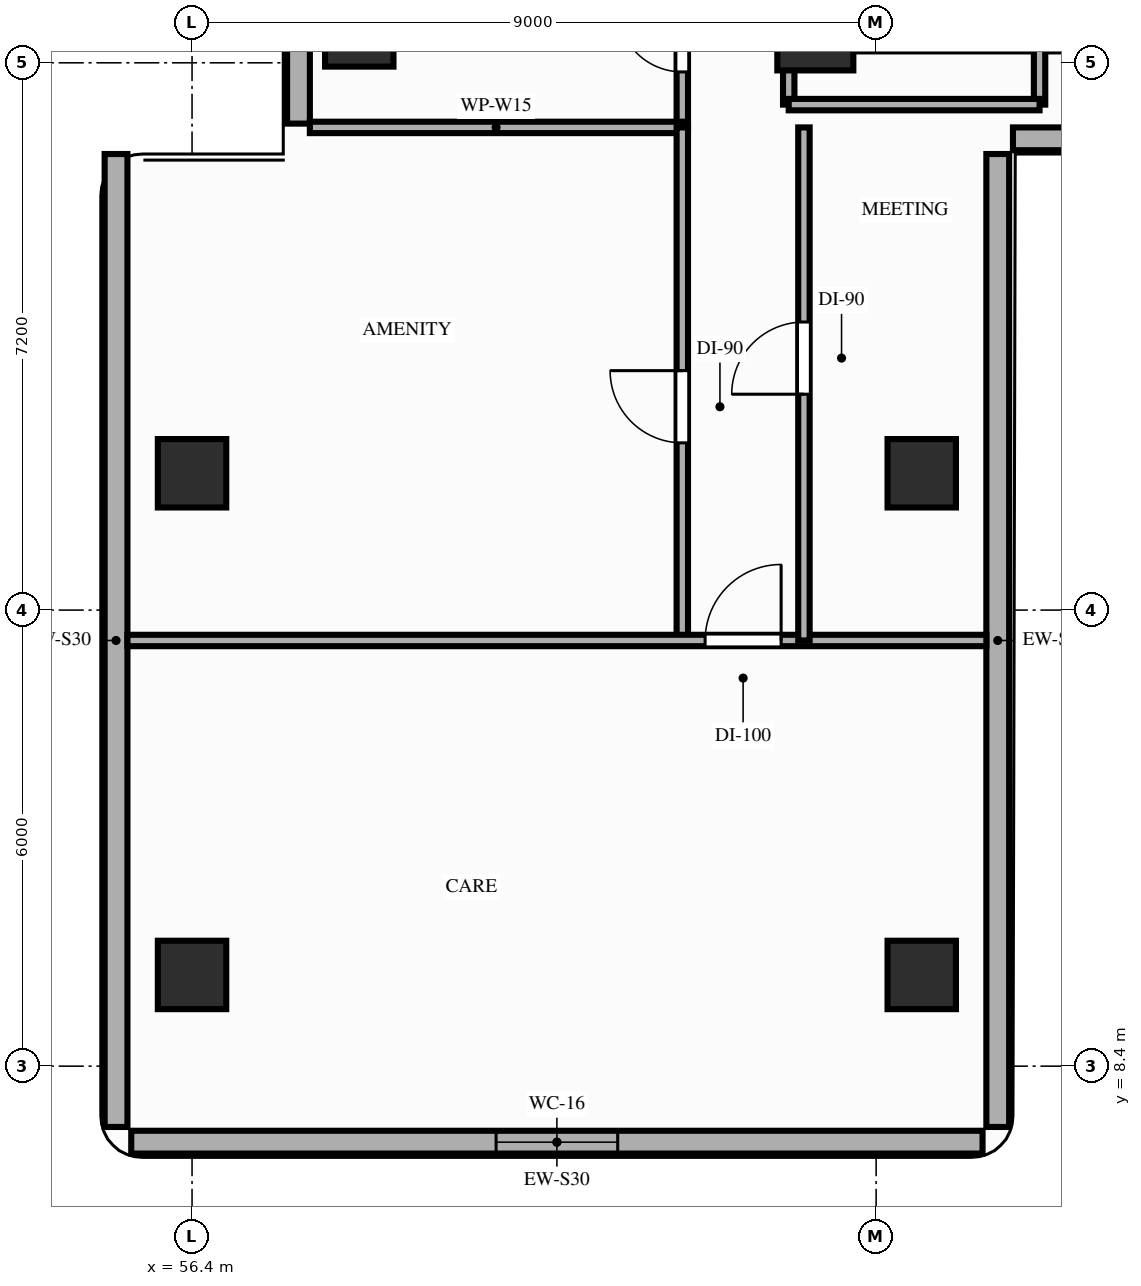
"""IFC4 building model, lengths in metres.
Left out: names, types, materials, properties, quantities, classifications, styles, units other than length and angle.
Written with IfcOpenShell. Run it as: python <this file> out.ifc"""

import sys

from ifc_helpers import new_model, si_unit, direction, frame, frame_2d, origin, origin_2d, place, context, subcontext, project, spatial, rectangle, extrude, element, fill, save


model = new_model("IFC4")
c1 = context("Model", 3, precision=1e-05, world=origin(), true_north=direction((0.0, 1.0)))
c2 = subcontext(c1, "Body", "Model", "MODEL_VIEW")
j1 = project(units=[si_unit("LENGTHUNIT", "METRE"), si_unit("PLANEANGLEUNIT", "RADIAN")], contexts=[c1])
p1 = place(None, origin())
s1 = spatial("IfcSite", under=j1, at=p1, CompositionType="ELEMENT")
p2 = place(p1, origin())
s2 = spatial("IfcBuilding", under=s1, at=p2, CompositionType="ELEMENT")
p3 = place(p2, frame((0.0, 0.0, 69.2)))
s3 = spatial("IfcBuildingStorey", under=s2, at=p3, CompositionType="ELEMENT", Elevation=69.2)
p4 = place(p3, frame((64.6, 22.0, 0.0), z_axis=(0.0, 0.0, 1.0), x_axis=(1.0, 0.0, 0.0)))
e1 = element("IfcColumn", 1, at=p4, inside=s3, PredefinedType="COLUMN", context=c2, shape_type="SweptSolid", body=[
    extrude(rectangle(XDim=1.0, YDim=1.0, at=origin_2d()), origin(), (0.0, 0.0, 1.0), 3.2),
])
for number, where, z_axis, x_axis in (
    (2, (58.6, 22.0, 0.0), (0.0, 0.0, 1.0), (1.0, 0.0, 0.0)),
    (3, (56.4, 9.6, 0.0), (0.0, 0.0, 1.0), (1.0, 0.0, 0.0)),
    (4, (56.4, 16.2, 0.0), (0.0, 0.0, 1.0), (1.0, 0.0, 0.0)),
    (5, (66.0, 9.6, 0.0), (0.0, 0.0, 1.0), (1.0, 0.0, 0.0)),
    (6, (66.0, 16.2, 0.0), (0.0, 0.0, 1.0), (1.0, 0.0, 0.0)),
):
    element("IfcColumn", number, at=place(p3, frame(where, z_axis=z_axis, x_axis=x_axis)), inside=s3, PredefinedType="COLUMN", context=c2, shape_type="SweptSolid", body=[
        extrude(rectangle(XDim=0.9, YDim=0.9, at=origin_2d()), origin(), (0.0, 0.0, 1.0), 3.2),
    ])
p5 = place(p3, frame((57.8, 43.4, 0.0), z_axis=(0.0, 0.0, 1.0), x_axis=(0.0, -1.0, 0.0)))
e7 = element("IfcWall", 7, at=p5, inside=s3, PredefinedType="STANDARD", context=c2, shape_type="SweptSolid", body=[
    extrude(rectangle(XDim=22.6, YDim=0.3, at=frame_2d((11.3, 0.0))), origin(), (0.0, 0.0, 1.0), 2.6),
])
p6 = place(p5, frame((3.6, 0.0, 0.85)))
e8 = element("IfcOpeningElement", 8, at=p6, cuts=e7, PredefinedType="OPENING", context=c2, shape_type="SweptSolid", body=[
    extrude(rectangle(XDim=1.6, YDim=1.45, at=frame_2d((0.8, 0.725))), frame((0.0, 0.16, 0.0), z_axis=(0.0, -1.0, 0.0), x_axis=(1.0, 0.0, 0.0)), (0.0, 0.0, 1.0), 0.32),
])
p7 = place(p3, frame((55.6, 7.4, 0.0), z_axis=(0.0, 0.0, 1.0), x_axis=(1.0, 0.0, 0.0)))
e9 = element("IfcWall", 9, at=p7, inside=s3, PredefinedType="STANDARD", context=c2, shape_type="SweptSolid", body=[
    extrude(rectangle(XDim=11.2, YDim=0.3, at=frame_2d((5.6, 0.0))), origin(), (0.0, 0.0, 1.0), 3.02),
])
p8 = place(p7, frame((4.8, 0.0, 0.85)))
e10 = element("IfcOpeningElement", 10, at=p8, cuts=e9, PredefinedType="OPENING", context=c2, shape_type="SweptSolid", body=[
    extrude(rectangle(XDim=1.6, YDim=1.7, at=frame_2d((0.8, 0.85))), frame((0.0, 0.16, 0.0), z_axis=(0.0, -1.0, 0.0), x_axis=(1.0, 0.0, 0.0)), (0.0, 0.0, 1.0), 0.32),
])
for number, where, z_axis, x_axis in (
    (11, (55.4, 20.4, 0.0), (0.0, 0.0, 1.0), (0.0, -1.0, 0.0)),
    (12, (67.0, 7.6, 0.0), (0.0, 0.0, 1.0), (0.0, 1.0, 0.0)),
):
    element("IfcWall", number, at=place(p3, frame(where, z_axis=z_axis, x_axis=x_axis)), inside=s3, PredefinedType="STANDARD", context=c2, shape_type="SweptSolid", body=[
        extrude(rectangle(XDim=12.8, YDim=0.3, at=frame_2d((6.4, 0.0))), origin(), (0.0, 0.0, 1.0), 3.02),
    ])
p9 = place(p3, frame((67.2, 20.6, 0.0), z_axis=(0.0, 0.0, 1.0), x_axis=(1.0, 0.0, 0.0)))
e13 = element("IfcWall", 13, at=p9, inside=s3, PredefinedType="STANDARD", context=c2, shape_type="SweptSolid", body=[
    extrude(rectangle(XDim=5.6, YDim=0.3, at=frame_2d((2.8, 0.0))), origin(), (0.0, 0.0, 1.0), 3.02),
])
p10 = place(p3, frame((64.25, 21.05, 0.0), z_axis=(0.0, 0.0, 1.0), x_axis=(0.0, 1.0, 0.0)))
e14 = element("IfcWall", 14, at=p10, inside=s3, PredefinedType="PARTITIONING", context=c2, shape_type="SweptSolid", body=[
    extrude(rectangle(XDim=6.55, YDim=0.15, at=frame_2d((3.275, 0.0))), origin(), (0.0, 0.0, 1.0), 2.6),
])
p11 = place(p10, frame((3.1, 0.0, 0.0)))
e15 = element("IfcOpeningElement", 15, at=p11, cuts=e14, PredefinedType="OPENING", context=c2, shape_type="SweptSolid", body=[
    extrude(rectangle(XDim=0.95, YDim=2.15, at=frame_2d((0.475, 1.075))), frame((0.0, 0.085, 0.0), z_axis=(0.0, -1.0, 0.0), x_axis=(1.0, 0.0, 0.0)), (0.0, 0.0, 1.0), 0.17),
])
p12 = place(p3, frame((67.55, 21.05, 0.0), z_axis=(0.0, 0.0, 1.0), x_axis=(0.0, 1.0, 0.0)))
e16 = element("IfcWall", 16, at=p12, inside=s3, PredefinedType="PARTITIONING", context=c2, shape_type="SweptSolid", body=[
    extrude(rectangle(XDim=6.47, YDim=0.15, at=frame_2d((3.235, 0.0))), origin(), (0.0, 0.0, 1.0), 2.6),
])
p13 = place(p3, frame((64.25, 21.05, 0.0), z_axis=(0.0, 0.0, 1.0), x_axis=(1.0, 0.0, 0.0)))
e17 = element("IfcWall", 17, at=p13, inside=s3, PredefinedType="PARTITIONING", context=c2, shape_type="SweptSolid", body=[
    extrude(rectangle(XDim=3.3, YDim=0.15, at=frame_2d((1.65, 0.0))), origin(), (0.0, 0.0, 1.0), 2.6),
])
p14 = place(p3, frame((62.85, 20.75, 0.0), z_axis=(0.0, 0.0, 1.0), x_axis=(0.0, 1.0, 0.0)))
e18 = element("IfcWall", 18, at=p14, inside=s3, PredefinedType="PARTITIONING", context=c2, shape_type="SweptSolid", body=[
    extrude(rectangle(XDim=22.7, YDim=0.15, at=frame_2d((11.35, 0.0))), origin(), (0.0, 0.0, 1.0), 2.6),
])
p15 = place(p14, frame((0.73, 0.0, 0.0)))
e19 = element("IfcOpeningElement", 19, at=p15, cuts=e18, PredefinedType="OPENING", context=c2, shape_type="SweptSolid", body=[
    extrude(rectangle(XDim=0.85, YDim=2.1, at=frame_2d((0.425, 1.05))), frame((0.0, 0.085, 0.0), z_axis=(0.0, -1.0, 0.0), x_axis=(1.0, 0.0, 0.0)), (0.0, 0.0, 1.0), 0.17),
])
p16 = place(p14, frame((3.43, 0.0, 0.0)))
e20 = element("IfcOpeningElement", 20, at=p16, cuts=e18, PredefinedType="OPENING", context=c2, shape_type="SweptSolid", body=[
    extrude(rectangle(XDim=0.95, YDim=2.1, at=frame_2d((0.475, 1.05))), frame((0.0, 0.085, 0.0), z_axis=(0.0, -1.0, 0.0), x_axis=(1.0, 0.0, 0.0)), (0.0, 0.0, 1.0), 0.17),
])
p17 = place(p14, frame((8.15, 0.0, 0.0)))
e21 = element("IfcOpeningElement", 21, at=p17, cuts=e18, PredefinedType="OPENING", context=c2, shape_type="SweptSolid", body=[
    extrude(rectangle(XDim=0.95, YDim=2.15, at=frame_2d((0.475, 1.075))), frame((0.0, 0.085, 0.0), z_axis=(0.0, -1.0, 0.0), x_axis=(1.0, 0.0, 0.0)), (0.0, 0.0, 1.0), 0.17),
])
p18 = place(p14, frame((18.89, 0.0, 0.0)))
e22 = element("IfcOpeningElement", 22, at=p18, cuts=e18, PredefinedType="OPENING", context=c2, shape_type="SweptSolid", body=[
    extrude(rectangle(XDim=0.95, YDim=2.15, at=frame_2d((0.475, 1.075))), frame((0.0, 0.085, 0.0), z_axis=(0.0, -1.0, 0.0), x_axis=(1.0, 0.0, 0.0)), (0.0, 0.0, 1.0), 0.17),
])
p19 = place(p3, frame((57.95, 20.75, 0.0), z_axis=(0.0, 0.0, 1.0), x_axis=(1.0, 0.0, 0.0)))
e23 = element("IfcWall", 23, at=p19, inside=s3, PredefinedType="PARTITIONING", context=c2, shape_type="SweptSolid", body=[
    extrude(rectangle(XDim=4.9, YDim=0.15, at=frame_2d((2.45, 0.0))), origin(), (0.0, 0.0, 1.0), 2.6),
])
p20 = place(p3, frame((62.85, 14.0, 0.0), z_axis=(0.0, 0.0, 1.0), x_axis=(0.0, 1.0, 0.0)))
e24 = element("IfcWall", 24, at=p20, inside=s3, PredefinedType="PARTITIONING", context=c2, shape_type="SweptSolid", body=[
    extrude(rectangle(XDim=6.75, YDim=0.15, at=frame_2d((3.375, 0.0))), origin(), (0.0, 0.0, 1.0), 2.6),
])
p21 = place(p20, frame((2.6, 0.0, 0.0)))
e25 = element("IfcOpeningElement", 25, at=p21, cuts=e24, PredefinedType="OPENING", context=c2, shape_type="SweptSolid", body=[
    extrude(rectangle(XDim=0.95, YDim=2.15, at=frame_2d((0.475, 1.075))), frame((0.0, 0.085, 0.0), z_axis=(0.0, -1.0, 0.0), x_axis=(1.0, 0.0, 0.0)), (0.0, 0.0, 1.0), 0.17),
])
p22 = place(p3, frame((55.55, 14.0, 0.0), z_axis=(0.0, 0.0, 1.0), x_axis=(1.0, 0.0, 0.0)))
e26 = element("IfcWall", 26, at=p22, inside=s3, PredefinedType="PARTITIONING", context=c2, shape_type="SweptSolid", body=[
    extrude(rectangle(XDim=11.3, YDim=0.15, at=frame_2d((5.65, 0.0))), origin(), (0.0, 0.0, 1.0), 2.6),
])
p23 = place(p22, frame((7.6, 0.0, 0.0)))
e27 = element("IfcOpeningElement", 27, at=p23, cuts=e26, PredefinedType="OPENING", context=c2, shape_type="SweptSolid", body=[
    extrude(rectangle(XDim=1.0, YDim=2.15, at=frame_2d((0.5, 1.075))), frame((0.0, 0.085, 0.0), z_axis=(0.0, -1.0, 0.0), x_axis=(1.0, 0.0, 0.0)), (0.0, 0.0, 1.0), 0.17),
])
p24 = place(p3, frame((64.45, 14.0, 0.0), z_axis=(0.0, 0.0, 1.0), x_axis=(0.0, 1.0, 0.0)))
e28 = element("IfcWall", 28, at=p24, inside=s3, PredefinedType="PARTITIONING", context=c2, shape_type="SweptSolid", body=[
    extrude(rectangle(XDim=6.75, YDim=0.15, at=frame_2d((3.375, 0.0))), origin(), (0.0, 0.0, 1.0), 2.6),
])
p25 = place(p24, frame((3.24, 0.0, 0.0)))
e29 = element("IfcOpeningElement", 29, at=p25, cuts=e28, PredefinedType="OPENING", context=c2, shape_type="SweptSolid", body=[
    extrude(rectangle(XDim=0.95, YDim=2.15, at=frame_2d((0.475, 1.075))), frame((0.0, 0.085, 0.0), z_axis=(0.0, -1.0, 0.0), x_axis=(1.0, 0.0, 0.0)), (0.0, 0.0, 1.0), 0.17),
])
p26 = place(p8, origin())
e30 = element("IfcWindow", 30, at=p26, inside=s3, PartitioningType="SINGLE_PANEL", PredefinedType="WINDOW", context=c2, shape_type="SweptSolid", body=[
    extrude(rectangle(XDim=1.6, YDim=1.7, at=frame_2d((0.8, 0.85))), frame((0.0, 0.03, 0.0), z_axis=(0.0, -1.0, 0.0), x_axis=(1.0, 0.0, 0.0)), (0.0, 0.0, 1.0), 0.06),
])
fill(e10, e30)
p27 = place(p15, origin())
e31 = element("IfcDoor", 31, at=p27, inside=s3, OperationType="SINGLE_SWING_RIGHT", PredefinedType="DOOR", context=c2, shape_type="SweptSolid", body=[
    extrude(rectangle(XDim=0.85, YDim=2.1, at=frame_2d((0.425, 1.05))), frame((0.0, 0.025, 0.0), z_axis=(0.0, -1.0, 0.0), x_axis=(1.0, 0.0, 0.0)), (0.0, 0.0, 1.0), 0.05),
])
fill(e19, e31)
p28 = place(p21, origin())
e32 = element("IfcDoor", 32, at=p28, inside=s3, OperationType="SINGLE_SWING_RIGHT", PredefinedType="DOOR", context=c2, shape_type="SweptSolid", body=[
    extrude(rectangle(XDim=0.95, YDim=2.15, at=frame_2d((0.475, 1.075))), frame((0.0, 0.025, 0.0), z_axis=(0.0, -1.0, 0.0), x_axis=(1.0, 0.0, 0.0)), (0.0, 0.0, 1.0), 0.05),
])
fill(e25, e32)
p29 = place(p25, origin())
e33 = element("IfcDoor", 33, at=p29, inside=s3, OperationType="SINGLE_SWING_LEFT", PredefinedType="DOOR", context=c2, shape_type="SweptSolid", body=[
    extrude(rectangle(XDim=0.95, YDim=2.15, at=frame_2d((0.475, 1.075))), frame((0.0, 0.025, 0.0), z_axis=(0.0, -1.0, 0.0), x_axis=(1.0, 0.0, 0.0)), (0.0, 0.0, 1.0), 0.05),
])
fill(e29, e33)
p30 = place(p23, origin())
e34 = element("IfcDoor", 34, at=p30, inside=s3, OperationType="SINGLE_SWING_RIGHT", PredefinedType="DOOR", context=c2, shape_type="SweptSolid", body=[
    extrude(rectangle(XDim=1.0, YDim=2.15, at=frame_2d((0.5, 1.075))), frame((0.0, 0.025, 0.0), z_axis=(0.0, -1.0, 0.0), x_axis=(1.0, 0.0, 0.0)), (0.0, 0.0, 1.0), 0.05),
])
fill(e27, e34)
save(model, sys.argv[1])
